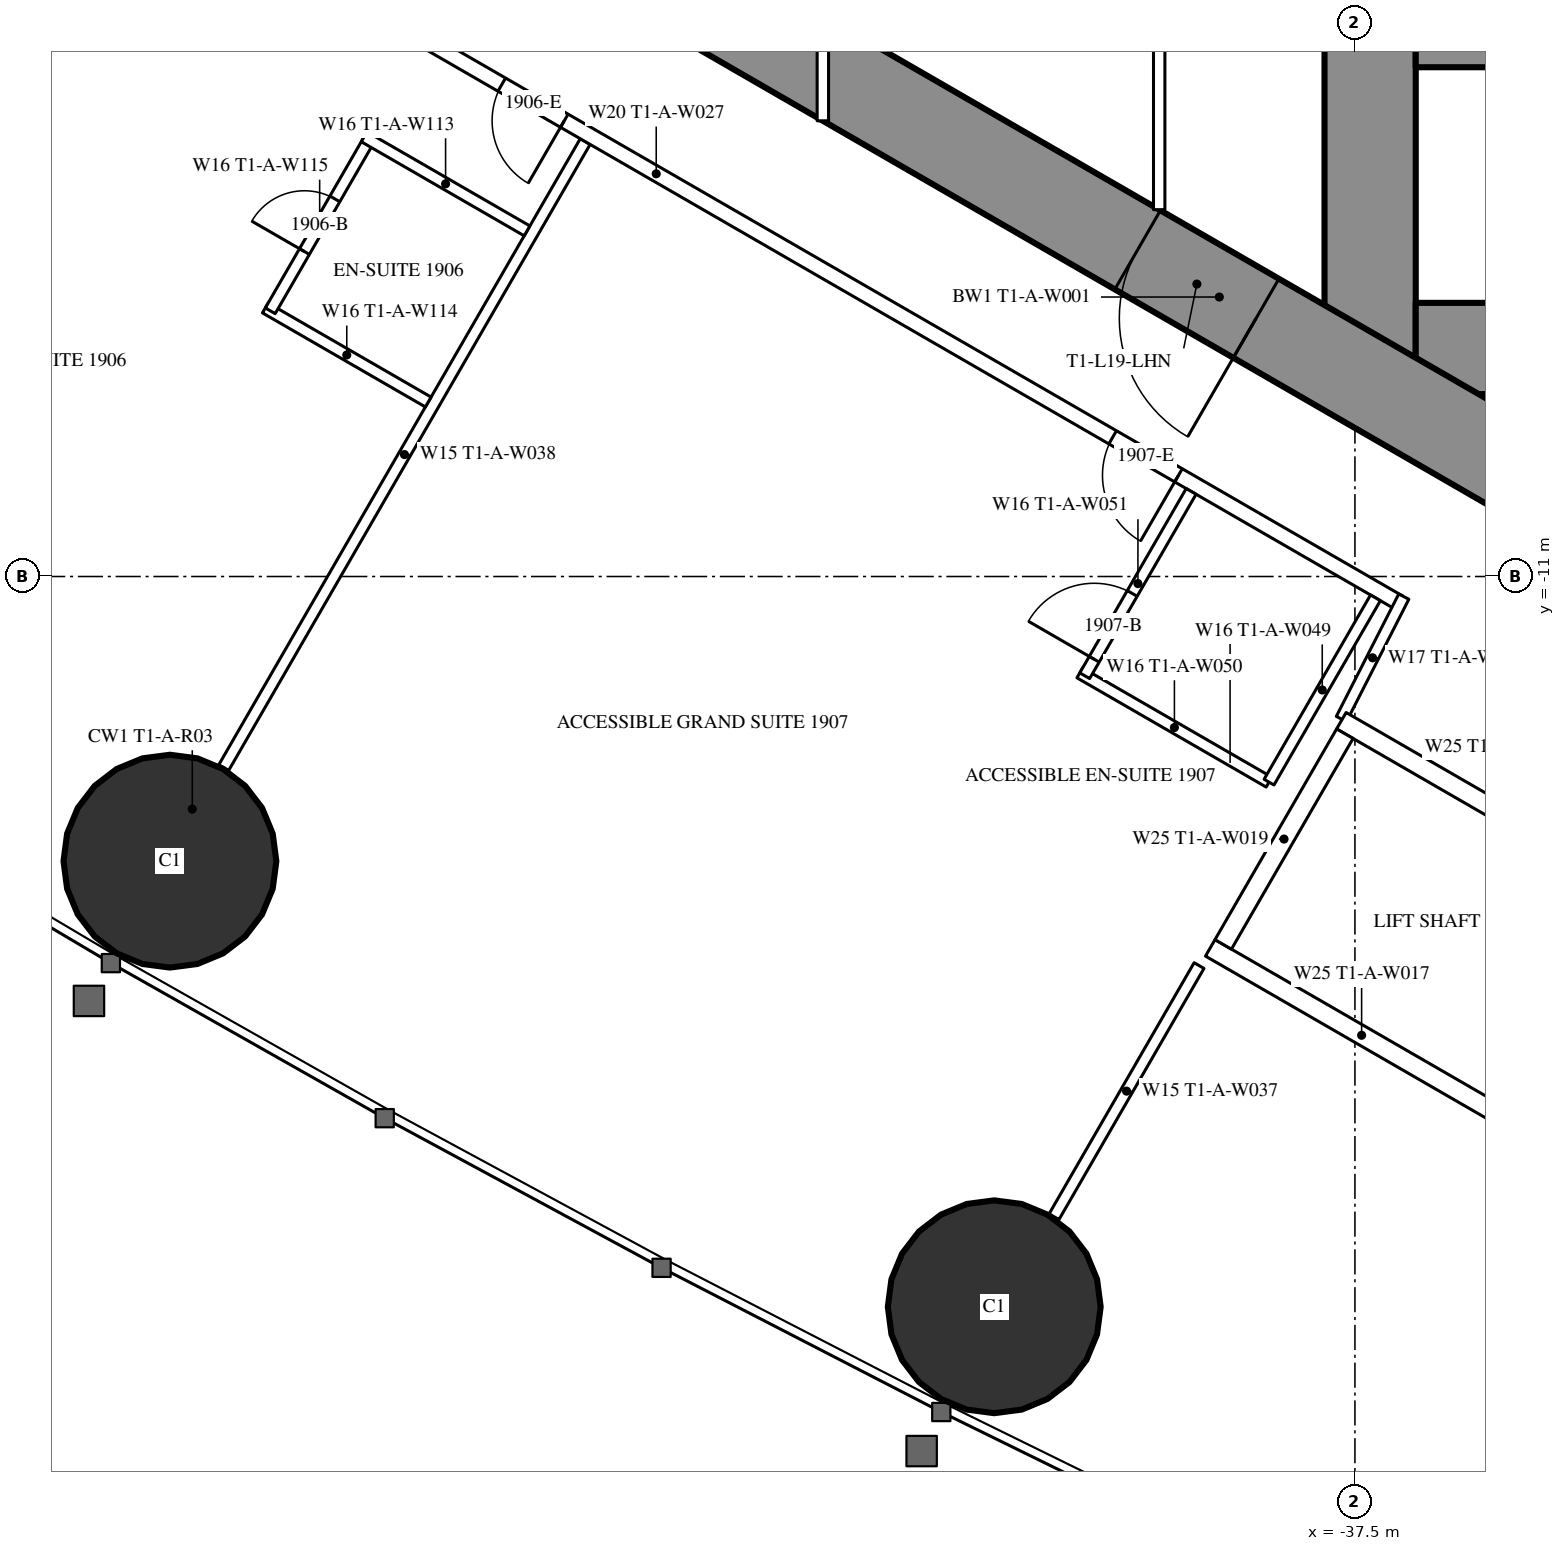
"""IFC4 building model, lengths in metres.
Left out: names, types, materials, properties, quantities, classifications, styles, units other than length and angle.
Written with IfcOpenShell. Run it as: python <this file> out.ifc"""

import sys

from ifc_helpers import new_model, si_unit, direction, frame, frame_2d, origin, origin_2d, place, context, subcontext, project, spatial, rectangle, hollow_circle, extrude, element, fill, save


model = new_model("IFC4")
c1 = context("Model", 3, precision=1e-05, world=origin(), true_north=direction((0.0, 1.0)))
c2 = subcontext(c1, "Body", "Model", "MODEL_VIEW")
j1 = project(units=[si_unit("LENGTHUNIT", "METRE"), si_unit("PLANEANGLEUNIT", "RADIAN")], contexts=[c1])
p1 = place(None, origin())
s1 = spatial("IfcSite", under=j1, at=p1, CompositionType="ELEMENT")
p2 = place(p1, origin())
s2 = spatial("IfcBuilding", under=s1, at=p2, CompositionType="ELEMENT")
p3 = place(p2, frame((0.0, 0.0, 74.0)))
s3 = spatial("IfcBuildingStorey", under=s2, at=p3, CompositionType="ELEMENT", Elevation=74.0)
for number, where, z_axis, x_axis in (
    (1, (-53.09, -14.745, 0.0), (0.0, 0.0, 1.0), (1.0, 0.0, 0.0)),
    (2, (-42.245, -20.607, 0.0), (0.0, 0.0, 1.0), (1.0, 0.0, 0.0)),
):
    element("IfcColumn", number, at=place(p3, frame(where, z_axis=z_axis, x_axis=x_axis)), inside=s3, PredefinedType="COLUMN", context=c2, shape_type="SweptSolid", body=[
        extrude(hollow_circle(Radius=1.4, WallThickness=0.12, at=origin_2d()), origin(), (0.0, 0.0, 1.0), 3.5),
    ])
p4 = place(p3, frame((-37.3, 8.6, 0.0), z_axis=(0.0, 0.0, 1.0), x_axis=(0.0, -1.0, 0.0)))
e3 = element("IfcWall", 3, at=p4, inside=s3, PredefinedType="SHEAR", context=c2, shape_type="SweptSolid", body=[
    extrude(rectangle(XDim=17.2, YDim=1.2, at=frame_2d((8.6, 0.0))), origin(), (0.0, 0.0, 1.0), 3.5),
])
p5 = place(p4, frame((7.7, 0.0, 0.0)))
e4 = element("IfcOpeningElement", 4, at=p5, cuts=e3, PredefinedType="OPENING", context=c2, shape_type="SweptSolid", body=[
    extrude(rectangle(XDim=1.8, YDim=2.2, at=frame_2d((0.9, 1.1))), frame((0.0, 0.61, 0.0), z_axis=(0.0, -1.0, 0.0), x_axis=(1.0, 0.0, 0.0)), (0.0, 0.0, 1.0), 1.22),
])
p6 = place(p3, frame((-28.3, -8.0, 0.0), z_axis=(0.0, 0.0, 1.0), x_axis=(-1.0, 0.0, 0.0)))
e5 = element("IfcWall", 5, at=p6, inside=s3, PredefinedType="SHEAR", context=c2, shape_type="SweptSolid", body=[
    extrude(rectangle(XDim=8.4, YDim=1.2, at=frame_2d((4.2, 0.0))), origin(), (0.0, 0.0, 1.0), 3.5),
])
p7 = place(p6, frame((0.25, 0.0, 0.0)))
e6 = element("IfcOpeningElement", 6, at=p7, cuts=e5, PredefinedType="OPENING", context=c2, shape_type="SweptSolid", body=[
    extrude(rectangle(XDim=1.0, YDim=2.2, at=frame_2d((0.5, 1.1))), frame((0.0, 0.61, 0.0), z_axis=(0.0, -1.0, 0.0), x_axis=(1.0, 0.0, 0.0)), (0.0, 0.0, 1.0), 1.22),
])
p8 = place(p3, frame((-28.3, -4.15, 0.0), z_axis=(0.0, 0.0, 1.0), x_axis=(-1.0, 0.0, 0.0)))
e7 = element("IfcWall", 7, at=p8, inside=s3, PredefinedType="SHEAR", context=c2, shape_type="SweptSolid", body=[
    extrude(rectangle(XDim=8.4, YDim=0.3, at=frame_2d((4.2, 0.0))), origin(), (0.0, 0.0, 1.0), 3.5),
])
p9 = place(p3, frame((-27.2, -14.3, 0.0), z_axis=(0.0, 0.0, 1.0), x_axis=(-0.866024021859, 0.500002393557, 0.0)))
e8 = element("IfcWall", 8, at=p9, inside=s3, PredefinedType="SHEAR", context=c2, shape_type="SweptSolid", body=[
    extrude(rectangle(XDim=27.907, YDim=1.2, at=frame_2d((13.954, 0.0))), origin(), (0.0, 0.0, 1.0), 3.5),
])
p10 = place(p9, frame((4.6, 0.0, 0.0)))
e9 = element("IfcOpeningElement", 9, at=p10, cuts=e8, PredefinedType="OPENING", context=c2, shape_type="SweptSolid", body=[
    extrude(rectangle(XDim=1.0, YDim=2.2, at=frame_2d((0.5, 1.1))), frame((0.0, 0.61, 0.0), z_axis=(0.0, -1.0, 0.0), x_axis=(1.0, 0.0, 0.0)), (0.0, 0.0, 1.0), 1.22),
])
p11 = place(p9, frame((13.395, 0.0, 0.0)))
e10 = element("IfcOpeningElement", 10, at=p11, cuts=e8, PredefinedType="OPENING", context=c2, shape_type="SweptSolid", body=[
    extrude(rectangle(XDim=1.8, YDim=2.2, at=frame_2d((0.9, 1.1))), frame((0.0, 0.61, 0.0), z_axis=(0.0, -1.0, 0.0), x_axis=(1.0, 0.0, 0.0)), (0.0, 0.0, 1.0), 1.22),
])
p12 = place(p3, frame((-47.627, -5.278, 0.0), z_axis=(0.0, 0.0, 1.0), x_axis=(-0.500009844318, -0.86601972009, 0.0)))
e11 = element("IfcWall", 11, at=p12, inside=s3, PredefinedType="PARTITIONING", context=c2, shape_type="SweptSolid", body=[
    extrude(rectangle(XDim=9.51, YDim=0.15, at=frame_2d((4.755, 0.0))), origin(), (0.0, 0.0, 1.0), 2.25),
])
p13 = place(p3, frame((-39.551, -16.118, 0.0), z_axis=(0.0, 0.0, 1.0), x_axis=(-0.499986503906, -0.866033195618, 0.0)))
e12 = element("IfcWall", 12, at=p13, inside=s3, PredefinedType="PARTITIONING", context=c2, shape_type="SweptSolid", body=[
    extrude(rectangle(XDim=3.815, YDim=0.15, at=frame_2d((1.907, 0.0))), origin(), (0.0, 0.0, 1.0), 3.25),
])
p14 = place(p3, frame((-36.92, -11.344, 0.0), z_axis=(0.0, 0.0, 1.0), x_axis=(-0.866028313256, 0.499994960614, 0.0)))
e13 = element("IfcWall", 13, at=p14, inside=s3, PredefinedType="PARTITIONING", context=c2, shape_type="SweptSolid", body=[
    extrude(rectangle(XDim=22.568, YDim=0.2, at=frame_2d((11.284, 0.0))), origin(), (0.0, 0.0, 1.0), 3.25),
])
p15 = place(p14, frame((20.958, 0.0, 0.0)))
e14 = element("IfcOpeningElement", 14, at=p15, cuts=e13, PredefinedType="OPENING", context=c2, shape_type="SweptSolid", body=[
    extrude(rectangle(XDim=0.95, YDim=2.2, at=frame_2d((0.475, 1.1))), frame((0.0, 0.11, 0.0), z_axis=(0.0, -1.0, 0.0), x_axis=(1.0, 0.0, 0.0)), (0.0, 0.0, 1.0), 0.22),
])
p16 = place(p14, frame((12.68, 0.0, 0.0)))
e15 = element("IfcOpeningElement", 15, at=p16, cuts=e13, PredefinedType="OPENING", context=c2, shape_type="SweptSolid", body=[
    extrude(rectangle(XDim=0.95, YDim=2.2, at=frame_2d((0.475, 1.1))), frame((0.0, 0.11, 0.0), z_axis=(0.0, -1.0, 0.0), x_axis=(1.0, 0.0, 0.0)), (0.0, 0.0, 1.0), 0.22),
])
p17 = place(p14, frame((3.35, 0.0, 0.0)))
e16 = element("IfcOpeningElement", 16, at=p17, cuts=e13, PredefinedType="OPENING", context=c2, shape_type="SweptSolid", body=[
    extrude(rectangle(XDim=1.0, YDim=2.2, at=frame_2d((0.5, 1.1))), frame((0.0, 0.11, 0.0), z_axis=(0.0, -1.0, 0.0), x_axis=(1.0, 0.0, 0.0)), (0.0, 0.0, 1.0), 0.22),
])
p18 = place(p3, frame((-36.857, -11.265, 0.0), z_axis=(0.0, 0.0, 1.0), x_axis=(-0.454225294761, -0.890886851176, 0.0)))
e17 = element("IfcWall", 17, at=p18, inside=s3, PredefinedType="PARTITIONING", context=c2, shape_type="SweptSolid", body=[
    extrude(rectangle(XDim=1.807, YDim=0.15, at=frame_2d((0.904, 0.0))), origin(), (0.0, 0.0, 1.0), 3.25),
])
p19 = place(p3, frame((-49.692, -8.704, 0.0), z_axis=(0.0, 0.0, 1.0), x_axis=(-0.866073894602, 0.499916002032, 0.0)))
e18 = element("IfcWall", 18, at=p19, inside=s3, PredefinedType="PARTITIONING", context=c2, shape_type="SweptSolid", body=[
    extrude(rectangle(XDim=2.475, YDim=0.15, at=frame_2d((1.238, 0.0))), origin(), (0.0, 0.0, 1.0), 3.25),
])
p20 = place(p3, frame((-50.47, -5.253, 0.0), z_axis=(0.0, 0.0, 1.0), x_axis=(-0.500006934395, -0.866021400173, 0.0)))
e19 = element("IfcWall", 19, at=p20, inside=s3, PredefinedType="PARTITIONING", context=c2, shape_type="SweptSolid", body=[
    extrude(rectangle(XDim=2.6, YDim=0.15, at=frame_2d((1.3, 0.0))), origin(), (0.0, 0.0, 1.0), 3.25),
])
p21 = place(p20, frame((0.9, 0.0, 0.0)))
e20 = element("IfcOpeningElement", 20, at=p21, cuts=e19, PredefinedType="OPENING", context=c2, shape_type="SweptSolid", body=[
    extrude(rectangle(XDim=0.8, YDim=2.2, at=frame_2d((0.4, 1.1))), frame((0.0, 0.085, 0.0), z_axis=(0.0, -1.0, 0.0), x_axis=(1.0, 0.0, 0.0)), (0.0, 0.0, 1.0), 0.17),
])
p22 = place(p3, frame((-48.392, -6.453, 0.0), z_axis=(0.0, 0.0, 1.0), x_axis=(-0.86604923931, 0.499958713387, 0.0)))
e21 = element("IfcWall", 21, at=p22, inside=s3, PredefinedType="PARTITIONING", context=c2, shape_type="SweptSolid", body=[
    extrude(rectangle(XDim=2.475, YDim=0.15, at=frame_2d((1.237, 0.0))), origin(), (0.0, 0.0, 1.0), 3.25),
])
p23 = place(p3, frame((-38.63, -13.705, 0.0), z_axis=(0.0, 0.0, 1.0), x_axis=(-0.866018712932, 0.500011588718, 0.0)))
e22 = element("IfcWall", 22, at=p23, inside=s3, PredefinedType="PARTITIONING", context=c2, shape_type="SweptSolid", body=[
    extrude(rectangle(XDim=2.875, YDim=0.15, at=frame_2d((1.438, 0.0))), origin(), (0.0, 0.0, 1.0), 3.25),
])
p24 = place(p3, frame((-39.655, -9.88, 0.0), z_axis=(0.0, 0.0, 1.0), x_axis=(-0.500049511043, -0.865996816683, 0.0)))
e23 = element("IfcWall", 23, at=p24, inside=s3, PredefinedType="PARTITIONING", context=c2, shape_type="SweptSolid", body=[
    extrude(rectangle(XDim=2.8, YDim=0.15, at=frame_2d((1.4, 0.0))), origin(), (0.0, 0.0, 1.0), 3.25),
])
p25 = place(p24, frame((1.55, 0.0, 0.0)))
e24 = element("IfcOpeningElement", 24, at=p25, cuts=e23, PredefinedType="OPENING", context=c2, shape_type="SweptSolid", body=[
    extrude(rectangle(XDim=1.0, YDim=2.2, at=frame_2d((0.5, 1.1))), frame((0.0, 0.085, 0.0), z_axis=(0.0, -1.0, 0.0), x_axis=(1.0, 0.0, 0.0)), (0.0, 0.0, 1.0), 0.17),
])
p26 = place(p3, frame((-37.23, -11.281, 0.0), z_axis=(0.0, 0.0, 1.0), x_axis=(-0.500049511043, -0.865996816683, 0.0)))
e25 = element("IfcWall", 25, at=p26, inside=s3, PredefinedType="PARTITIONING", context=c2, shape_type="SweptSolid", body=[
    extrude(rectangle(XDim=2.8, YDim=0.15, at=frame_2d((1.4, 0.0))), origin(), (0.0, 0.0, 1.0), 3.25),
])
p27 = place(p3, frame((-40.075, 1.2, 0.0), z_axis=(0.0, 0.0, 1.0), x_axis=(0.0, -1.0, 0.0)))
e26 = element("IfcWall", 26, at=p27, inside=s3, PredefinedType="PARTITIONING", context=c2, shape_type="SweptSolid", body=[
    extrude(rectangle(XDim=7.374, YDim=0.15, at=frame_2d((3.687, 0.0))), origin(), (0.0, 0.0, 1.0), 3.25),
])
p28 = place(p27, frame((2.787, 0.0, 0.0)))
e27 = element("IfcOpeningElement", 27, at=p28, cuts=e26, PredefinedType="OPENING", context=c2, shape_type="SweptSolid", body=[
    extrude(rectangle(XDim=1.8, YDim=2.2, at=frame_2d((0.9, 1.1))), frame((0.0, 0.085, 0.0), z_axis=(0.0, -1.0, 0.0), x_axis=(1.0, 0.0, 0.0)), (0.0, 0.0, 1.0), 0.17),
])
p29 = place(p3, frame((-44.5, 5.005, 0.0), z_axis=(0.0, 0.0, 1.0), x_axis=(0.0, -1.0, 0.0)))
e28 = element("IfcWall", 28, at=p29, inside=s3, PredefinedType="PARTITIONING", context=c2, shape_type="SweptSolid", body=[
    extrude(rectangle(XDim=10.009, YDim=0.15, at=frame_2d((5.005, 0.0))), origin(), (0.0, 0.0, 1.0), 2.45),
])
p30 = place(p29, frame((2.002, 0.0, 0.0)))
e29 = element("IfcOpeningElement", 29, at=p30, cuts=e28, PredefinedType="OPENING", context=c2, shape_type="SweptSolid", body=[
    extrude(rectangle(XDim=1.0, YDim=2.2, at=frame_2d((0.5, 1.1))), frame((0.0, 0.085, 0.0), z_axis=(0.0, -1.0, 0.0), x_axis=(1.0, 0.0, 0.0)), (0.0, 0.0, 1.0), 0.17),
])
p31 = place(p29, frame((7.007, 0.0, 0.0)))
e30 = element("IfcOpeningElement", 30, at=p31, cuts=e28, PredefinedType="OPENING", context=c2, shape_type="SweptSolid", body=[
    extrude(rectangle(XDim=1.0, YDim=2.2, at=frame_2d((0.5, 1.1))), frame((0.0, 0.085, 0.0), z_axis=(0.0, -1.0, 0.0), x_axis=(1.0, 0.0, 0.0)), (0.0, 0.0, 1.0), 0.17),
])
p32 = place(p3, frame((-33.696, -15.197, 0.0), z_axis=(0.0, 0.0, 1.0), x_axis=(-0.865976953817, 0.500083908417, 0.0)))
e31 = element("IfcWall", 31, at=p32, inside=s3, PredefinedType="PARTITIONING", context=c2, shape_type="SweptSolid", body=[
    extrude(rectangle(XDim=4.599, YDim=0.25, at=frame_2d((2.3, 0.0))), origin(), (0.0, 0.0, 1.0), 3.25),
])
p33 = place(p3, frame((-35.42, -18.186, 0.0), z_axis=(0.0, 0.0, 1.0), x_axis=(-0.865990227814, 0.50006092162, 0.0)))
e32 = element("IfcWall", 32, at=p33, inside=s3, PredefinedType="PARTITIONING", context=c2, shape_type="SweptSolid", body=[
    extrude(rectangle(XDim=4.6, YDim=0.25, at=frame_2d((2.3, 0.0))), origin(), (0.0, 0.0, 1.0), 3.25),
])
p34 = place(p3, frame((-37.633, -13.068, 0.0), z_axis=(0.0, 0.0, 1.0), x_axis=(-0.499872130319, -0.866099216793, 0.0)))
e33 = element("IfcWall", 33, at=p34, inside=s3, PredefinedType="PARTITIONING", context=c2, shape_type="SweptSolid", body=[
    extrude(rectangle(XDim=3.2, YDim=0.25, at=frame_2d((1.6, 0.0))), origin(), (0.0, 0.0, 1.0), 3.25),
])
p35 = place(p21, origin())
e34 = element("IfcDoor", 34, at=p35, inside=s3, OperationType="SINGLE_SWING_RIGHT", PredefinedType="DOOR", context=c2, shape_type="SweptSolid", body=[
    extrude(rectangle(XDim=0.8, YDim=2.2, at=frame_2d((0.4, 1.1))), frame((0.0, 0.025, 0.0), z_axis=(0.0, -1.0, 0.0), x_axis=(1.0, 0.0, 0.0)), (0.0, 0.0, 1.0), 0.05),
])
fill(e20, e34)
p36 = place(p16, origin())
e35 = element("IfcDoor", 35, at=p36, inside=s3, OperationType="SINGLE_SWING_LEFT", PredefinedType="DOOR", context=c2, shape_type="SweptSolid", body=[
    extrude(rectangle(XDim=0.95, YDim=2.2, at=frame_2d((0.475, 1.1))), frame((0.0, 0.025, 0.0), z_axis=(0.0, -1.0, 0.0), x_axis=(1.0, 0.0, 0.0)), (0.0, 0.0, 1.0), 0.05),
])
fill(e15, e35)
p37 = place(p25, origin())
e36 = element("IfcDoor", 36, at=p37, inside=s3, OperationType="SINGLE_SWING_RIGHT", PredefinedType="DOOR", context=c2, shape_type="SweptSolid", body=[
    extrude(rectangle(XDim=1.0, YDim=2.2, at=frame_2d((0.5, 1.1))), frame((0.0, 0.025, 0.0), z_axis=(0.0, -1.0, 0.0), x_axis=(1.0, 0.0, 0.0)), (0.0, 0.0, 1.0), 0.05),
])
fill(e24, e36)
p38 = place(p17, origin())
e37 = element("IfcDoor", 37, at=p38, inside=s3, OperationType="SINGLE_SWING_LEFT", PredefinedType="DOOR", context=c2, shape_type="SweptSolid", body=[
    extrude(rectangle(XDim=1.0, YDim=2.2, at=frame_2d((0.5, 1.1))), frame((0.0, 0.025, 0.0), z_axis=(0.0, -1.0, 0.0), x_axis=(1.0, 0.0, 0.0)), (0.0, 0.0, 1.0), 0.05),
])
fill(e16, e37)
p39 = place(p11, origin())
e38 = element("IfcDoor", 38, at=p39, inside=s3, OperationType="DOUBLE_DOOR_SINGLE_SWING", PredefinedType="DOOR", context=c2, shape_type="SweptSolid", body=[
    extrude(rectangle(XDim=1.8, YDim=2.2, at=frame_2d((0.9, 1.1))), frame((0.0, 0.025, 0.0), z_axis=(0.0, -1.0, 0.0), x_axis=(1.0, 0.0, 0.0)), (0.0, 0.0, 1.0), 0.05),
])
fill(e10, e38)
save(model, sys.argv[1])
